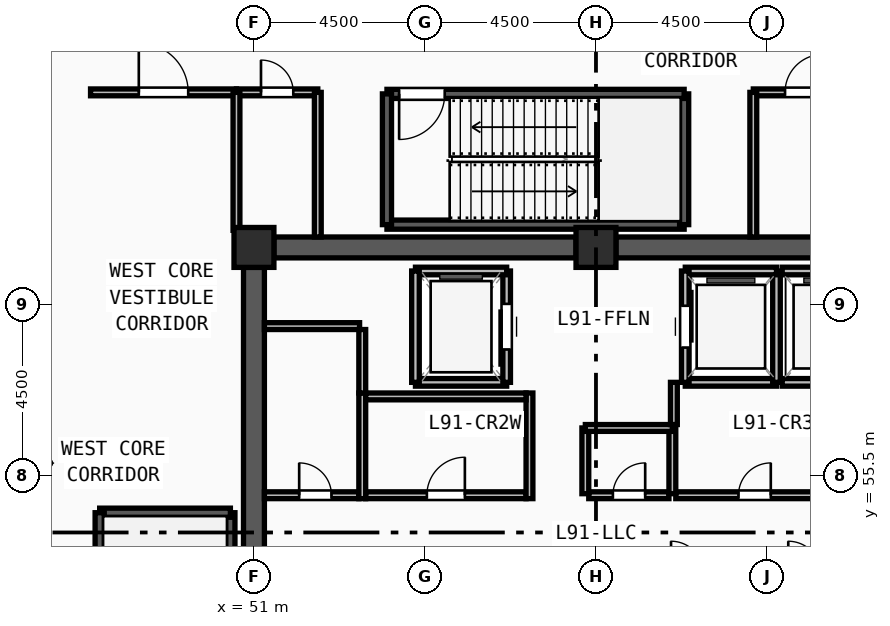
"""IFC4 building model, lengths in metres.
Left out: names, types, materials, properties, quantities, classifications, styles, units other than length and angle.
Written with IfcOpenShell. Run it as: python <this file> out.ifc"""

import sys

from ifc_helpers import new_model, si_unit, direction, frame, frame_2d, origin, origin_2d, place, context, subcontext, project, spatial, rectangle, extrude, source, transform, mapped, element, fill, save


model = new_model("IFC4")
c1 = context("Model", 3, precision=1e-05, world=origin(), true_north=direction((0.0, 1.0)))
c2 = subcontext(c1, "Body", "Model", "MODEL_VIEW")
j1 = project(units=[si_unit("LENGTHUNIT", "METRE"), si_unit("PLANEANGLEUNIT", "RADIAN")], contexts=[c1])
p1 = place(None, origin())
s1 = spatial("IfcSite", under=j1, at=p1, CompositionType="ELEMENT")
p2 = place(p1, origin())
s2 = spatial("IfcBuilding", under=s1, at=p2, CompositionType="ELEMENT")
p3 = place(p2, frame((0.0, 0.0, 351.0)))
s3 = spatial("IfcBuildingStorey", under=s2, at=p3, CompositionType="ELEMENT", Elevation=351.0)
m1 = source(origin(), c2, "Body", "SweptSolid", [
    extrude(rectangle(XDim=1.05, YDim=1.05, at=origin_2d()), origin(), (0.0, 0.0, 1.0), 4.8),
])
for number, where, z_axis, x_axis in (
    (1, (60.0, 61.5, 0.0), (0.0, 0.0, 1.0), (1.0, 0.0, 0.0)),
    (2, (51.0, 61.5, 0.0), (0.0, 0.0, 1.0), (1.0, 0.0, 0.0)),
):
    element("IfcColumn", number, at=place(p3, frame(where, z_axis=z_axis, x_axis=x_axis)), inside=s3, PredefinedType="COLUMN", context=c2, shape_type="MappedRepresentation", body=[
        mapped(m1, transform((0.0, 0.0, 0.0), x_axis=(1.0, 0.0, 0.0), y_axis=(0.0, 1.0, 0.0), z_axis=(0.0, 0.0, 1.0), scale=1.0)),
    ])
for number, where, z_axis, x_axis in (
    (3, (51.525, 61.5, 0.0), (0.0, 0.0, 1.0), (1.0, 0.0, 0.0)),
    (4, (60.525, 61.5, 0.0), (0.0, 0.0, 1.0), (1.0, 0.0, 0.0)),
):
    element("IfcWall", number, at=place(p3, frame(where, z_axis=z_axis, x_axis=x_axis)), inside=s3, PredefinedType="SHEAR", context=c2, shape_type="SweptSolid", body=[
        extrude(rectangle(XDim=7.95, YDim=0.55, at=frame_2d((3.975, 0.0))), origin(), (0.0, 0.0, 1.0), 4.52),
    ])
p4 = place(p3, frame((51.0, 47.025, 0.0), z_axis=(0.0, 0.0, 1.0), x_axis=(0.0, 1.0, 0.0)))
e5 = element("IfcWall", 5, at=p4, inside=s3, PredefinedType="SHEAR", context=c2, shape_type="SweptSolid", body=[
    extrude(rectangle(XDim=13.95, YDim=0.55, at=frame_2d((6.975, 0.0))), origin(), (0.0, 0.0, 1.0), 4.52),
])
p5 = place(p3, frame((50.38, 46.7, 0.0), z_axis=(0.0, 0.0, 1.0), x_axis=(0.0, 1.0, 0.0)))
e6 = element("IfcWall", 6, at=p5, inside=s3, PredefinedType="SOLIDWALL", context=c2, shape_type="SweptSolid", body=[
    extrude(rectangle(XDim=7.82, YDim=0.24, at=frame_2d((3.91, 0.0))), origin(), (0.0, 0.0, 1.0), 4.52),
])
p6 = place(p3, frame((50.38, 54.52, 0.0), z_axis=(0.0, 0.0, 1.0), x_axis=(-1.0, 0.0, 0.0)))
e7 = element("IfcWall", 7, at=p6, inside=s3, PredefinedType="SOLIDWALL", context=c2, shape_type="SweptSolid", body=[
    extrude(rectangle(XDim=3.44, YDim=0.24, at=frame_2d((1.72, 0.0))), origin(), (0.0, 0.0, 1.0), 4.52),
])
p7 = place(p3, frame((46.94, 54.52, 0.0), z_axis=(0.0, 0.0, 1.0), x_axis=(0.0, -1.0, 0.0)))
e8 = element("IfcWall", 8, at=p7, inside=s3, PredefinedType="SOLIDWALL", context=c2, shape_type="SweptSolid", body=[
    extrude(rectangle(XDim=7.82, YDim=0.24, at=frame_2d((3.91, 0.0))), origin(), (0.0, 0.0, 1.0), 4.52),
])
m2 = source(origin(), c2, "Body", "SweptSolid", [
    extrude(rectangle(XDim=1.2, YDim=2.2, at=frame_2d((0.6, 1.1))), frame((0.0, 0.13, 0.0), z_axis=(0.0, -1.0, 0.0), x_axis=(1.0, 0.0, 0.0)), (0.0, 0.0, 1.0), 0.26),
])
p8 = place(p7, frame((6.3, 0.0, 0.0)))
e9 = element("IfcOpeningElement", 9, at=p8, cuts=e8, PredefinedType="OPENING", context=c2, shape_type="MappedRepresentation", body=[
    mapped(m2, transform((0.0, 0.0, 0.0), x_axis=(1.0, 0.0, 0.0), y_axis=(0.0, 1.0, 0.0), z_axis=(0.0, 0.0, 1.0), scale=1.0)),
])
p9 = place(p3, frame((54.5, 62.1, 0.0), z_axis=(0.0, 0.0, 1.0), x_axis=(1.0, 0.0, 0.0)))
e10 = element("IfcWall", 10, at=p9, inside=s3, PredefinedType="SOLIDWALL", context=c2, shape_type="SweptSolid", body=[
    extrude(rectangle(XDim=7.82, YDim=0.24, at=frame_2d((3.91, 0.0))), origin(), (0.0, 0.0, 1.0), 4.52),
])
p10 = place(p3, frame((62.32, 62.1, 0.0), z_axis=(0.0, 0.0, 1.0), x_axis=(0.0, 1.0, 0.0)))
e11 = element("IfcWall", 11, at=p10, inside=s3, PredefinedType="SOLIDWALL", context=c2, shape_type="SweptSolid", body=[
    extrude(rectangle(XDim=3.44, YDim=0.24, at=frame_2d((1.72, 0.0))), origin(), (0.0, 0.0, 1.0), 4.52),
])
p11 = place(p3, frame((62.32, 65.54, 0.0), z_axis=(0.0, 0.0, 1.0), x_axis=(-1.0, 0.0, 0.0)))
e12 = element("IfcWall", 12, at=p11, inside=s3, PredefinedType="SOLIDWALL", context=c2, shape_type="SweptSolid", body=[
    extrude(rectangle(XDim=7.82, YDim=0.24, at=frame_2d((3.91, 0.0))), origin(), (0.0, 0.0, 1.0), 4.52),
])
p12 = place(p11, frame((6.3, 0.0, 0.0)))
e13 = element("IfcOpeningElement", 13, at=p12, cuts=e12, PredefinedType="OPENING", context=c2, shape_type="MappedRepresentation", body=[
    mapped(m2, transform((0.0, 0.0, 0.0), x_axis=(1.0, 0.0, 0.0), y_axis=(0.0, 1.0, 0.0), z_axis=(0.0, 0.0, 1.0), scale=1.0)),
])
p13 = place(p3, frame((54.5, 65.54, 0.0), z_axis=(0.0, 0.0, 1.0), x_axis=(0.0, -1.0, 0.0)))
e14 = element("IfcWall", 14, at=p13, inside=s3, PredefinedType="SOLIDWALL", context=c2, shape_type="SweptSolid", body=[
    extrude(rectangle(XDim=3.44, YDim=0.24, at=frame_2d((1.72, 0.0))), origin(), (0.0, 0.0, 1.0), 4.52),
])
p14 = place(p3, frame((55.25, 57.95, 0.0), z_axis=(0.0, 0.0, 1.0), x_axis=(1.0, 0.0, 0.0)))
e15 = element("IfcWall", 15, at=p14, inside=s3, PredefinedType="SOLIDWALL", context=c2, shape_type="SweptSolid", body=[
    extrude(rectangle(XDim=2.4, YDim=0.2, at=frame_2d((1.2, 0.0))), origin(), (0.0, 0.0, 1.0), 4.52),
])
p15 = place(p3, frame((57.65, 57.95, 0.0), z_axis=(0.0, 0.0, 1.0), x_axis=(0.0, 1.0, 0.0)))
e16 = element("IfcWall", 16, at=p15, inside=s3, PredefinedType="SOLIDWALL", context=c2, shape_type="SweptSolid", body=[
    extrude(rectangle(XDim=2.93, YDim=0.2, at=frame_2d((1.465, 0.0))), origin(), (0.0, 0.0, 1.0), 4.52),
])
m3 = source(origin(), c2, "Body", "SweptSolid", [
    extrude(rectangle(XDim=1.2, YDim=2.3, at=frame_2d((0.6, 1.15))), frame((0.0, 0.11, 0.0), z_axis=(0.0, -1.0, 0.0), x_axis=(1.0, 0.0, 0.0)), (0.0, 0.0, 1.0), 0.22),
])
p16 = place(p15, frame((0.865, 0.0, 0.0)))
e17 = element("IfcOpeningElement", 17, at=p16, cuts=e16, PredefinedType="OPENING", context=c2, shape_type="MappedRepresentation", body=[
    mapped(m3, transform((0.0, 0.0, 0.0), x_axis=(1.0, 0.0, 0.0), y_axis=(0.0, 1.0, 0.0), z_axis=(0.0, 0.0, 1.0), scale=1.0)),
])
p17 = place(p3, frame((57.65, 60.88, 0.0), z_axis=(0.0, 0.0, 1.0), x_axis=(-1.0, 0.0, 0.0)))
e18 = element("IfcWall", 18, at=p17, inside=s3, PredefinedType="SOLIDWALL", context=c2, shape_type="SweptSolid", body=[
    extrude(rectangle(XDim=2.4, YDim=0.2, at=frame_2d((1.2, 0.0))), origin(), (0.0, 0.0, 1.0), 4.52),
])
p18 = place(p3, frame((55.25, 60.88, 0.0), z_axis=(0.0, 0.0, 1.0), x_axis=(0.0, -1.0, 0.0)))
e19 = element("IfcWall", 19, at=p18, inside=s3, PredefinedType="SOLIDWALL", context=c2, shape_type="SweptSolid", body=[
    extrude(rectangle(XDim=2.93, YDim=0.2, at=frame_2d((1.465, 0.0))), origin(), (0.0, 0.0, 1.0), 4.52),
])
p19 = place(p3, frame((62.35, 57.95, 0.0), z_axis=(0.0, 0.0, 1.0), x_axis=(1.0, 0.0, 0.0)))
e20 = element("IfcWall", 20, at=p19, inside=s3, PredefinedType="SOLIDWALL", context=c2, shape_type="SweptSolid", body=[
    extrude(rectangle(XDim=2.4, YDim=0.2, at=frame_2d((1.2, 0.0))), origin(), (0.0, 0.0, 1.0), 4.52),
])
p20 = place(p3, frame((64.75, 57.95, 0.0), z_axis=(0.0, 0.0, 1.0), x_axis=(0.0, 1.0, 0.0)))
e21 = element("IfcWall", 21, at=p20, inside=s3, PredefinedType="SOLIDWALL", context=c2, shape_type="SweptSolid", body=[
    extrude(rectangle(XDim=2.93, YDim=0.2, at=frame_2d((1.465, 0.0))), origin(), (0.0, 0.0, 1.0), 4.52),
])
p21 = place(p3, frame((64.75, 60.88, 0.0), z_axis=(0.0, 0.0, 1.0), x_axis=(-1.0, 0.0, 0.0)))
e22 = element("IfcWall", 22, at=p21, inside=s3, PredefinedType="SOLIDWALL", context=c2, shape_type="SweptSolid", body=[
    extrude(rectangle(XDim=2.4, YDim=0.2, at=frame_2d((1.2, 0.0))), origin(), (0.0, 0.0, 1.0), 4.52),
])
p22 = place(p3, frame((62.35, 60.88, 0.0), z_axis=(0.0, 0.0, 1.0), x_axis=(0.0, -1.0, 0.0)))
e23 = element("IfcWall", 23, at=p22, inside=s3, PredefinedType="SOLIDWALL", context=c2, shape_type="SweptSolid", body=[
    extrude(rectangle(XDim=2.93, YDim=0.2, at=frame_2d((1.465, 0.0))), origin(), (0.0, 0.0, 1.0), 4.52),
])
m4 = source(origin(), c2, "Body", "SweptSolid", [
    extrude(rectangle(XDim=1.1, YDim=2.2, at=frame_2d((0.55, 1.1))), frame((0.0, 0.11, 0.0), z_axis=(0.0, -1.0, 0.0), x_axis=(1.0, 0.0, 0.0)), (0.0, 0.0, 1.0), 0.22),
])
p23 = place(p22, frame((0.915, 0.0, 0.0)))
e24 = element("IfcOpeningElement", 24, at=p23, cuts=e23, PredefinedType="OPENING", context=c2, shape_type="MappedRepresentation", body=[
    mapped(m4, transform((0.0, 0.0, 0.0), x_axis=(1.0, 0.0, 0.0), y_axis=(0.0, 1.0, 0.0), z_axis=(0.0, 0.0, 1.0), scale=1.0)),
])
for number, where, z_axis, x_axis in (
    (25, (64.9, 57.95, 0.0), (0.0, 0.0, 1.0), (1.0, 0.0, 0.0)),
    (26, (67.3, 60.88, 0.0), (0.0, 0.0, 1.0), (-1.0, 0.0, 0.0)),
):
    element("IfcWall", number, at=place(p3, frame(where, z_axis=z_axis, x_axis=x_axis)), inside=s3, PredefinedType="SOLIDWALL", context=c2, shape_type="SweptSolid", body=[
        extrude(rectangle(XDim=2.4, YDim=0.2, at=frame_2d((1.2, 0.0))), origin(), (0.0, 0.0, 1.0), 4.52),
    ])
p24 = place(p3, frame((53.94, 54.98, 0.0), z_axis=(0.0, 0.0, 1.0), x_axis=(1.0, 0.0, 0.0)))
e27 = element("IfcWall", 27, at=p24, inside=s3, PredefinedType="PARTITIONING", context=c2, shape_type="SweptSolid", body=[
    extrude(rectangle(XDim=4.22, YDim=0.18, at=frame_2d((2.11, 0.0))), origin(), (0.0, 0.0, 1.0), 4.52),
])
m5 = source(origin(), c2, "Body", "SweptSolid", [
    extrude(rectangle(XDim=1.0, YDim=2.2, at=frame_2d((0.5, 1.1))), frame((0.0, 0.1, 0.0), z_axis=(0.0, -1.0, 0.0), x_axis=(1.0, 0.0, 0.0)), (0.0, 0.0, 1.0), 0.2),
])
p25 = place(p24, frame((1.61, 0.0, 0.0)))
e28 = element("IfcOpeningElement", 28, at=p25, cuts=e27, PredefinedType="OPENING", context=c2, shape_type="MappedRepresentation", body=[
    mapped(m5, transform((0.0, 0.0, 0.0), x_axis=(1.0, 0.0, 0.0), y_axis=(0.0, 1.0, 0.0), z_axis=(0.0, 0.0, 1.0), scale=1.0)),
])
p26 = place(p3, frame((51.275, 54.98, 0.0), z_axis=(0.0, 0.0, 1.0), x_axis=(1.0, 0.0, 0.0)))
e29 = element("IfcWall", 29, at=p26, inside=s3, PredefinedType="PARTITIONING", context=c2, shape_type="SweptSolid", body=[
    extrude(rectangle(XDim=2.485, YDim=0.18, at=frame_2d((1.243, 0.0))), origin(), (0.0, 0.0, 1.0), 4.52),
])
m6 = source(origin(), c2, "Body", "SweptSolid", [
    extrude(rectangle(XDim=0.85, YDim=2.1, at=frame_2d((0.425, 1.05))), frame((0.0, 0.1, 0.0), z_axis=(0.0, -1.0, 0.0), x_axis=(1.0, 0.0, 0.0)), (0.0, 0.0, 1.0), 0.2),
])
p27 = place(p26, frame((0.915, 0.0, 0.0)))
e30 = element("IfcOpeningElement", 30, at=p27, cuts=e29, PredefinedType="OPENING", context=c2, shape_type="MappedRepresentation", body=[
    mapped(m6, transform((0.0, 0.0, 0.0), x_axis=(1.0, 0.0, 0.0), y_axis=(0.0, 1.0, 0.0), z_axis=(0.0, 0.0, 1.0), scale=1.0)),
])
p28 = place(p3, frame((62.1, 54.98, 0.0), z_axis=(0.0, 0.0, 1.0), x_axis=(1.0, 0.0, 0.0)))
e31 = element("IfcWall", 31, at=p28, inside=s3, PredefinedType="PARTITIONING", context=c2, shape_type="SweptSolid", body=[
    extrude(rectangle(XDim=4.11, YDim=0.18, at=frame_2d((2.055, 0.0))), origin(), (0.0, 0.0, 1.0), 4.52),
])
p29 = place(p28, frame((1.65, 0.0, 0.0)))
e32 = element("IfcOpeningElement", 32, at=p29, cuts=e31, PredefinedType="OPENING", context=c2, shape_type="MappedRepresentation", body=[
    mapped(m6, transform((0.0, 0.0, 0.0), x_axis=(1.0, 0.0, 0.0), y_axis=(0.0, 1.0, 0.0), z_axis=(0.0, 0.0, 1.0), scale=1.0)),
])
p30 = place(p3, frame((59.81, 54.98, 0.0), z_axis=(0.0, 0.0, 1.0), x_axis=(1.0, 0.0, 0.0)))
e33 = element("IfcWall", 33, at=p30, inside=s3, PredefinedType="PARTITIONING", context=c2, shape_type="SweptSolid", body=[
    extrude(rectangle(XDim=2.11, YDim=0.18, at=frame_2d((1.055, 0.0))), origin(), (0.0, 0.0, 1.0), 4.52),
])
p31 = place(p30, frame((0.635, 0.0, 0.0)))
e34 = element("IfcOpeningElement", 34, at=p31, cuts=e33, PredefinedType="OPENING", context=c2, shape_type="MappedRepresentation", body=[
    mapped(m6, transform((0.0, 0.0, 0.0), x_axis=(1.0, 0.0, 0.0), y_axis=(0.0, 1.0, 0.0), z_axis=(0.0, 0.0, 1.0), scale=1.0)),
])
p32 = place(p3, frame((50.54, 65.58, 0.0), z_axis=(0.0, 0.0, 1.0), x_axis=(1.0, 0.0, 0.0)))
e35 = element("IfcWall", 35, at=p32, inside=s3, PredefinedType="PARTITIONING", context=c2, shape_type="SweptSolid", body=[
    extrude(rectangle(XDim=2.14, YDim=0.18, at=frame_2d((1.07, 0.0))), origin(), (0.0, 0.0, 1.0), 4.52),
])
p33 = place(p32, frame((0.645, 0.0, 0.0)))
e36 = element("IfcOpeningElement", 36, at=p33, cuts=e35, PredefinedType="OPENING", context=c2, shape_type="MappedRepresentation", body=[
    mapped(m6, transform((0.0, 0.0, 0.0), x_axis=(1.0, 0.0, 0.0), y_axis=(0.0, 1.0, 0.0), z_axis=(0.0, 0.0, 1.0), scale=1.0)),
])
p34 = place(p3, frame((64.14, 65.58, 0.0), z_axis=(0.0, 0.0, 1.0), x_axis=(1.0, 0.0, 0.0)))
e37 = element("IfcWall", 37, at=p34, inside=s3, PredefinedType="PARTITIONING", context=c2, shape_type="SweptSolid", body=[
    extrude(rectangle(XDim=2.67, YDim=0.18, at=frame_2d((1.335, 0.0))), origin(), (0.0, 0.0, 1.0), 4.52),
])
p35 = place(p34, frame((0.835, 0.0, 0.0)))
e38 = element("IfcOpeningElement", 38, at=p35, cuts=e37, PredefinedType="OPENING", context=c2, shape_type="MappedRepresentation", body=[
    mapped(m5, transform((0.0, 0.0, 0.0), x_axis=(1.0, 0.0, 0.0), y_axis=(0.0, 1.0, 0.0), z_axis=(0.0, 0.0, 1.0), scale=1.0)),
])
p36 = place(p3, frame((46.7, 65.58, 0.0), z_axis=(0.0, 0.0, 1.0), x_axis=(1.0, 0.0, 0.0)))
e39 = element("IfcWall", 39, at=p36, inside=s3, PredefinedType="PARTITIONING", context=c2, shape_type="SweptSolid", body=[
    extrude(rectangle(XDim=3.84, YDim=0.18, at=frame_2d((1.92, 0.0))), origin(), (0.0, 0.0, 1.0), 4.52),
])
m7 = source(origin(), c2, "Body", "SweptSolid", [
    extrude(rectangle(XDim=1.3, YDim=2.2, at=frame_2d((0.65, 1.1))), frame((0.0, 0.1, 0.0), z_axis=(0.0, -1.0, 0.0), x_axis=(1.0, 0.0, 0.0)), (0.0, 0.0, 1.0), 0.2),
])
p37 = place(p36, frame((1.27, 0.0, 0.0)))
e40 = element("IfcOpeningElement", 40, at=p37, cuts=e39, PredefinedType="OPENING", context=c2, shape_type="MappedRepresentation", body=[
    mapped(m7, transform((0.0, 0.0, 0.0), x_axis=(1.0, 0.0, 0.0), y_axis=(0.0, 1.0, 0.0), z_axis=(0.0, 0.0, 1.0), scale=1.0)),
])
p38 = place(p3, frame((51.275, 59.43, 0.0), z_axis=(0.0, 0.0, 1.0), x_axis=(1.0, 0.0, 0.0)))
e41 = element("IfcWall", 41, at=p38, inside=s3, PredefinedType="PARTITIONING", context=c2, shape_type="SweptSolid", body=[
    extrude(rectangle(XDim=2.505, YDim=0.18, at=frame_2d((1.252, 0.0))), origin(), (0.0, 0.0, 1.0), 4.52),
])
for number, where, z_axis, x_axis in (
    (42, (59.72, 55.02, 0.0), (0.0, 0.0, 1.0), (0.0, 1.0, 0.0)),
    (43, (62.01, 55.02, 0.0), (0.0, 0.0, 1.0), (0.0, 1.0, 0.0)),
):
    element("IfcWall", number, at=place(p3, frame(where, z_axis=z_axis, x_axis=x_axis)), inside=s3, PredefinedType="PARTITIONING", context=c2, shape_type="SweptSolid", body=[
        extrude(rectangle(XDim=1.73, YDim=0.18, at=frame_2d((0.865, 0.0))), origin(), (0.0, 0.0, 1.0), 4.52),
    ])
p39 = place(p3, frame((59.72, 56.75, 0.0), z_axis=(0.0, 0.0, 1.0), x_axis=(1.0, 0.0, 0.0)))
e44 = element("IfcWall", 44, at=p39, inside=s3, PredefinedType="PARTITIONING", context=c2, shape_type="SweptSolid", body=[
    extrude(rectangle(XDim=2.29, YDim=0.18, at=frame_2d((1.145, 0.0))), origin(), (0.0, 0.0, 1.0), 4.52),
])
p40 = place(p3, frame((50.54, 61.95, 0.0), z_axis=(0.0, 0.0, 1.0), x_axis=(0.0, 1.0, 0.0)))
e45 = element("IfcWall", 45, at=p40, inside=s3, PredefinedType="PARTITIONING", context=c2, shape_type="SweptSolid", body=[
    extrude(rectangle(XDim=3.63, YDim=0.18, at=frame_2d((1.815, 0.0))), origin(), (0.0, 0.0, 1.0), 4.52),
])
for number, where, z_axis, x_axis in (
    (46, (52.68, 61.775, 0.0), (0.0, 0.0, 1.0), (0.0, 1.0, 0.0)),
    (47, (64.14, 61.775, 0.0), (0.0, 0.0, 1.0), (0.0, 1.0, 0.0)),
):
    element("IfcWall", number, at=place(p3, frame(where, z_axis=z_axis, x_axis=x_axis)), inside=s3, PredefinedType="PARTITIONING", context=c2, shape_type="SweptSolid", body=[
        extrude(rectangle(XDim=3.805, YDim=0.18, at=frame_2d((1.903, 0.0))), origin(), (0.0, 0.0, 1.0), 4.52),
    ])
for number, where, z_axis, x_axis in (
    (48, (53.85, 54.89, 0.0), (0.0, 0.0, 1.0), (0.0, 1.0, 0.0)),
    (49, (58.25, 54.89, 0.0), (0.0, 0.0, 1.0), (0.0, 1.0, 0.0)),
):
    element("IfcWall", number, at=place(p3, frame(where, z_axis=z_axis, x_axis=x_axis)), inside=s3, PredefinedType="PARTITIONING", context=c2, shape_type="SweptSolid", body=[
        extrude(rectangle(XDim=2.78, YDim=0.18, at=frame_2d((1.39, 0.0))), origin(), (0.0, 0.0, 1.0), 4.52),
    ])
p41 = place(p3, frame((53.94, 57.58, 0.0), z_axis=(0.0, 0.0, 1.0), x_axis=(1.0, 0.0, 0.0)))
e50 = element("IfcWall", 50, at=p41, inside=s3, PredefinedType="PARTITIONING", context=c2, shape_type="SweptSolid", body=[
    extrude(rectangle(XDim=4.22, YDim=0.18, at=frame_2d((2.11, 0.0))), origin(), (0.0, 0.0, 1.0), 4.52),
])
p42 = place(p3, frame((53.85, 57.67, 0.0), z_axis=(0.0, 0.0, 1.0), x_axis=(0.0, 1.0, 0.0)))
e51 = element("IfcWall", 51, at=p42, inside=s3, PredefinedType="PARTITIONING", context=c2, shape_type="SweptSolid", body=[
    extrude(rectangle(XDim=1.67, YDim=0.18, at=frame_2d((0.835, 0.0))), origin(), (0.0, 0.0, 1.0), 4.52),
])
p43 = place(p3, frame((62.05, 56.84, 0.0), z_axis=(0.0, 0.0, 1.0), x_axis=(0.0, 1.0, 0.0)))
e52 = element("IfcWall", 52, at=p43, inside=s3, PredefinedType="PARTITIONING", context=c2, shape_type="SweptSolid", body=[
    extrude(rectangle(XDim=1.11, YDim=0.18, at=frame_2d((0.555, 0.0))), origin(), (0.0, 0.0, 1.0), 4.52),
])
m8 = source(origin(), c2, "Body", "SweptSolid", [
    extrude(rectangle(XDim=1.2, YDim=2.2, at=frame_2d((0.6, 1.1))), frame((0.0, 0.025, 0.0), z_axis=(0.0, -1.0, 0.0), x_axis=(1.0, 0.0, 0.0)), (0.0, 0.0, 1.0), 0.05),
])
p44 = place(p12, origin())
e53 = element("IfcDoor", 53, at=p44, inside=s3, OperationType="SINGLE_SWING_RIGHT", PredefinedType="DOOR", context=c2, shape_type="MappedRepresentation", body=[
    mapped(m8, transform((0.0, 0.0, 0.0), x_axis=(1.0, 0.0, 0.0), y_axis=(0.0, 1.0, 0.0), z_axis=(0.0, 0.0, 1.0), scale=1.0)),
])
fill(e13, e53)
m9 = source(origin(), c2, "Body", "SweptSolid", [
    extrude(rectangle(XDim=1.2, YDim=2.3, at=frame_2d((0.6, 1.15))), frame((0.0, 0.025, 0.0), z_axis=(0.0, -1.0, 0.0), x_axis=(1.0, 0.0, 0.0)), (0.0, 0.0, 1.0), 0.05),
])
p45 = place(p16, origin())
e54 = element("IfcDoor", 54, at=p45, inside=s3, OperationType="SLIDING_TO_LEFT", PredefinedType="DOOR", context=c2, shape_type="MappedRepresentation", body=[
    mapped(m9, transform((0.0, 0.0, 0.0), x_axis=(1.0, 0.0, 0.0), y_axis=(0.0, 1.0, 0.0), z_axis=(0.0, 0.0, 1.0), scale=1.0)),
])
fill(e17, e54)
m10 = source(origin(), c2, "Body", "SweptSolid", [
    extrude(rectangle(XDim=1.1, YDim=2.2, at=frame_2d((0.55, 1.1))), frame((0.0, 0.025, 0.0), z_axis=(0.0, -1.0, 0.0), x_axis=(1.0, 0.0, 0.0)), (0.0, 0.0, 1.0), 0.05),
])
p46 = place(p23, origin())
e55 = element("IfcDoor", 55, at=p46, inside=s3, OperationType="SLIDING_TO_LEFT", PredefinedType="DOOR", context=c2, shape_type="MappedRepresentation", body=[
    mapped(m10, transform((0.0, 0.0, 0.0), x_axis=(1.0, 0.0, 0.0), y_axis=(0.0, 1.0, 0.0), z_axis=(0.0, 0.0, 1.0), scale=1.0)),
])
fill(e24, e55)
m11 = source(origin(), c2, "Body", "SweptSolid", [
    extrude(rectangle(XDim=1.0, YDim=2.2, at=frame_2d((0.5, 1.1))), frame((0.0, 0.025, 0.0), z_axis=(0.0, -1.0, 0.0), x_axis=(1.0, 0.0, 0.0)), (0.0, 0.0, 1.0), 0.05),
])
p47 = place(p25, origin())
e56 = element("IfcDoor", 56, at=p47, inside=s3, OperationType="SINGLE_SWING_RIGHT", PredefinedType="DOOR", context=c2, shape_type="MappedRepresentation", body=[
    mapped(m11, transform((0.0, 0.0, 0.0), x_axis=(1.0, 0.0, 0.0), y_axis=(0.0, 1.0, 0.0), z_axis=(0.0, 0.0, 1.0), scale=1.0)),
])
fill(e28, e56)
m12 = source(origin(), c2, "Body", "SweptSolid", [
    extrude(rectangle(XDim=0.85, YDim=2.1, at=frame_2d((0.425, 1.05))), frame((0.0, 0.025, 0.0), z_axis=(0.0, -1.0, 0.0), x_axis=(1.0, 0.0, 0.0)), (0.0, 0.0, 1.0), 0.05),
])
p48 = place(p27, origin())
e57 = element("IfcDoor", 57, at=p48, inside=s3, OperationType="SINGLE_SWING_LEFT", PredefinedType="DOOR", context=c2, shape_type="MappedRepresentation", body=[
    mapped(m12, transform((0.0, 0.0, 0.0), x_axis=(1.0, 0.0, 0.0), y_axis=(0.0, 1.0, 0.0), z_axis=(0.0, 0.0, 1.0), scale=1.0)),
])
fill(e30, e57)
p49 = place(p29, origin())
e58 = element("IfcDoor", 58, at=p49, inside=s3, OperationType="SINGLE_SWING_RIGHT", PredefinedType="DOOR", context=c2, shape_type="MappedRepresentation", body=[
    mapped(m12, transform((0.0, 0.0, 0.0), x_axis=(1.0, 0.0, 0.0), y_axis=(0.0, 1.0, 0.0), z_axis=(0.0, 0.0, 1.0), scale=1.0)),
])
fill(e32, e58)
p50 = place(p31, origin())
e59 = element("IfcDoor", 59, at=p50, inside=s3, OperationType="SINGLE_SWING_RIGHT", PredefinedType="DOOR", context=c2, shape_type="MappedRepresentation", body=[
    mapped(m12, transform((0.0, 0.0, 0.0), x_axis=(1.0, 0.0, 0.0), y_axis=(0.0, 1.0, 0.0), z_axis=(0.0, 0.0, 1.0), scale=1.0)),
])
fill(e34, e59)
p51 = place(p33, origin())
e60 = element("IfcDoor", 60, at=p51, inside=s3, OperationType="SINGLE_SWING_LEFT", PredefinedType="DOOR", context=c2, shape_type="MappedRepresentation", body=[
    mapped(m12, transform((0.0, 0.0, 0.0), x_axis=(1.0, 0.0, 0.0), y_axis=(0.0, 1.0, 0.0), z_axis=(0.0, 0.0, 1.0), scale=1.0)),
])
fill(e36, e60)
p52 = place(p35, origin())
e61 = element("IfcDoor", 61, at=p52, inside=s3, OperationType="SINGLE_SWING_RIGHT", PredefinedType="DOOR", context=c2, shape_type="MappedRepresentation", body=[
    mapped(m11, transform((0.0, 0.0, 0.0), x_axis=(1.0, 0.0, 0.0), y_axis=(0.0, 1.0, 0.0), z_axis=(0.0, 0.0, 1.0), scale=1.0)),
])
fill(e38, e61)
m13 = source(origin(), c2, "Body", "SweptSolid", [
    extrude(rectangle(XDim=1.3, YDim=2.2, at=frame_2d((0.65, 1.1))), frame((0.0, 0.025, 0.0), z_axis=(0.0, -1.0, 0.0), x_axis=(1.0, 0.0, 0.0)), (0.0, 0.0, 1.0), 0.05),
])
p53 = place(p37, origin())
e62 = element("IfcDoor", 62, at=p53, inside=s3, OperationType="SINGLE_SWING_LEFT", PredefinedType="DOOR", context=c2, shape_type="MappedRepresentation", body=[
    mapped(m13, transform((0.0, 0.0, 0.0), x_axis=(1.0, 0.0, 0.0), y_axis=(0.0, 1.0, 0.0), z_axis=(0.0, 0.0, 1.0), scale=1.0)),
])
fill(e40, e62)
save(model, sys.argv[1])
